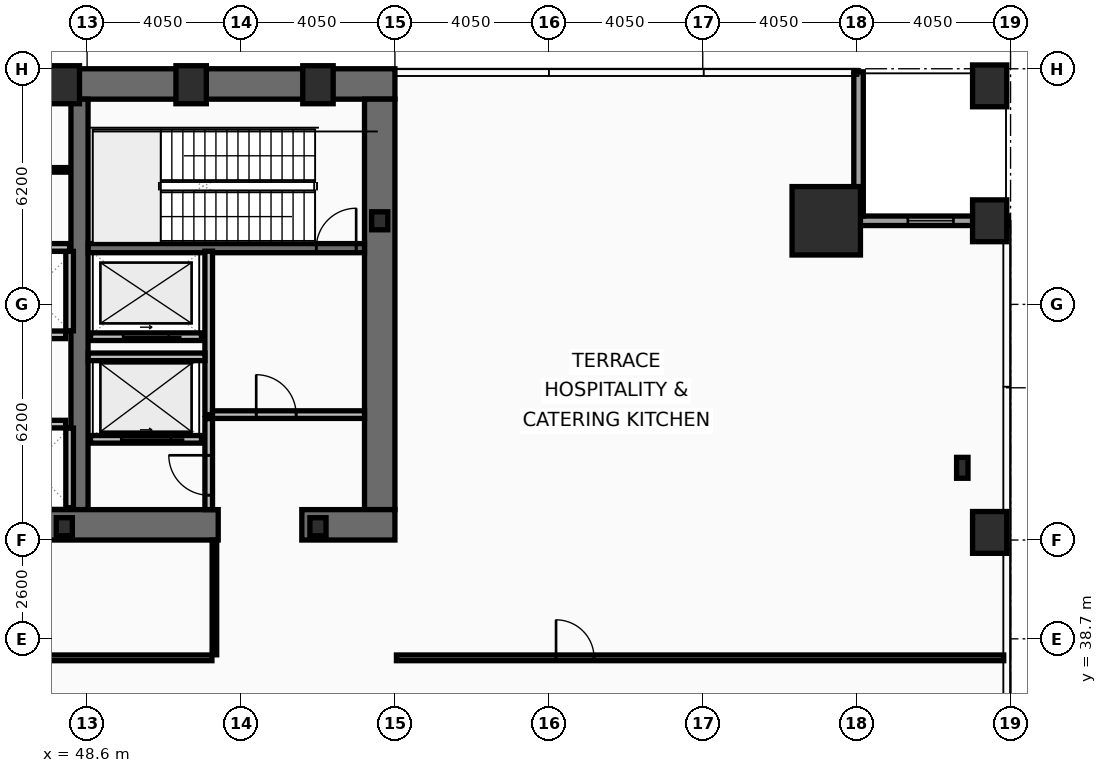
"""IFC4 building model, lengths in metres.
Left out: names, types, materials, properties, quantities, classifications, styles, units other than length and angle.
Written with IfcOpenShell. Run it as: python <this file> out.ifc"""

import sys

from ifc_helpers import new_model, si_unit, direction, frame, frame_2d, origin, origin_2d, place, context, subcontext, project, spatial, rectangle, hollow_rectangle, i_section, extrude, element, fill, save


model = new_model("IFC4")
c1 = context("Model", 3, precision=1e-05, world=origin(), true_north=direction((0.0, 1.0)))
c2 = subcontext(c1, "Body", "Model", "MODEL_VIEW")
j1 = project(units=[si_unit("LENGTHUNIT", "METRE"), si_unit("PLANEANGLEUNIT", "RADIAN")], contexts=[c1])
p1 = place(None, origin())
s1 = spatial("IfcSite", under=j1, at=p1, CompositionType="ELEMENT")
p2 = place(p1, origin())
s2 = spatial("IfcBuilding", under=s1, at=p2, CompositionType="ELEMENT")
p3 = place(p2, frame((0.0, 0.0, 5.4)))
s3 = spatial("IfcBuildingStorey", under=s2, at=p3, CompositionType="ELEMENT", Elevation=5.4)
p4 = place(p3, frame((16.2, 53.3, 0.0), z_axis=(0.0, 0.0, 1.0), x_axis=(1.0, 0.0, 0.0)))
e1 = element("IfcWall", 1, at=p4, inside=s3, PredefinedType="SHEAR", context=c2, shape_type="SweptSolid", body=[
    extrude(rectangle(XDim=40.5, YDim=0.8, at=frame_2d((20.25, 0.0))), origin(), (0.0, 0.0, 1.0), 4.8),
])
p5 = place(p3, frame((56.3, 52.9, 0.0), z_axis=(0.0, 0.0, 1.0), x_axis=(0.0, -1.0, 0.0)))
e2 = element("IfcWall", 2, at=p5, inside=s3, PredefinedType="SHEAR", context=c2, shape_type="SweptSolid", body=[
    extrude(rectangle(XDim=10.8, YDim=0.8, at=frame_2d((5.4, 0.0))), origin(), (0.0, 0.0, 1.0), 4.8),
])
p6 = place(p3, frame((48.4, 42.1, 0.0), z_axis=(0.0, 0.0, 1.0), x_axis=(0.0, 1.0, 0.0)))
e3 = element("IfcWall", 3, at=p6, inside=s3, PredefinedType="SHEAR", context=c2, shape_type="SweptSolid", body=[
    extrude(rectangle(XDim=10.8, YDim=0.45, at=frame_2d((5.4, 0.0))), origin(), (0.0, 0.0, 1.0), 4.8),
])
p7 = place(p3, frame((52.05, 41.7, 0.0), z_axis=(0.0, 0.0, 1.0), x_axis=(-1.0, 0.0, 0.0)))
e4 = element("IfcWall", 4, at=p7, inside=s3, PredefinedType="SHEAR", context=c2, shape_type="SweptSolid", body=[
    extrude(rectangle(XDim=11.3, YDim=0.8, at=frame_2d((5.65, 0.0))), origin(), (0.0, 0.0, 1.0), 4.8),
])
p8 = place(p3, frame((56.7, 41.7, 0.0), z_axis=(0.0, 0.0, 1.0), x_axis=(-1.0, 0.0, 0.0)))
e5 = element("IfcWall", 5, at=p8, inside=s3, PredefinedType="SHEAR", context=c2, shape_type="SweptSolid", body=[
    extrude(rectangle(XDim=2.45, YDim=0.8, at=frame_2d((1.225, 0.0))), origin(), (0.0, 0.0, 1.0), 4.8),
])
p9 = place(p3, frame((48.63, 48.98, 0.0), z_axis=(0.0, 0.0, 1.0), x_axis=(1.0, 0.0, 0.0)))
e6 = element("IfcWall", 6, at=p9, inside=s3, PredefinedType="SHEAR", context=c2, shape_type="SweptSolid", body=[
    extrude(rectangle(XDim=7.27, YDim=0.24, at=frame_2d((3.635, 0.0))), origin(), (0.0, 0.0, 1.0), 4.8),
])
p10 = place(p9, frame((6.0, 0.0, 0.0)))
e7 = element("IfcOpeningElement", 7, at=p10, cuts=e6, PredefinedType="OPENING", context=c2, shape_type="SweptSolid", body=[
    extrude(rectangle(XDim=1.05, YDim=2.15, at=frame_2d((0.525, 1.075))), frame((0.0, 0.13, 0.0), z_axis=(0.0, -1.0, 0.0), x_axis=(1.0, 0.0, 0.0)), (0.0, 0.0, 1.0), 0.26),
])
p11 = place(p3, frame((68.05, 49.7, 0.0), z_axis=(0.0, 0.0, 1.0), x_axis=(1.0, 0.0, 0.0)))
e8 = element("IfcColumn", 8, at=p11, inside=s3, PredefinedType="COLUMN", context=c2, shape_type="SweptSolid", body=[
    extrude(hollow_rectangle(XDim=1.8, YDim=1.8, WallThickness=0.08, at=origin_2d()), origin(), (0.0, 0.0, 1.0), 5.0),
])
for number, where, z_axis, x_axis in (
    (9, (48.0, 53.28, 0.0), (0.0, 0.0, 1.0), (1.0, 0.0, 0.0)),
    (10, (51.337, 53.28, 0.0), (0.0, 0.0, 1.0), (1.0, 0.0, 0.0)),
    (11, (54.675, 53.28, 0.0), (0.0, 0.0, 1.0), (1.0, 0.0, 0.0)),
):
    element("IfcColumn", number, at=place(p3, frame(where, z_axis=z_axis, x_axis=x_axis)), inside=s3, PredefinedType="COLUMN", context=c2, shape_type="SweptSolid", body=[
        extrude(hollow_rectangle(XDim=0.8, YDim=1.0, WallThickness=0.055, at=origin_2d()), origin(), (0.0, 0.0, 1.0), 5.0),
    ])
p12 = place(p3, frame((71.63, 43.2, 0.0), z_axis=(0.0, 0.0, 1.0), x_axis=(1.0, 0.0, 0.0)))
e12 = element("IfcColumn", 12, at=p12, inside=s3, PredefinedType="COLUMN", context=c2, shape_type="SweptSolid", body=[
    extrude(i_section(OverallWidth=0.3, OverallDepth=0.55, WebThickness=0.015, FlangeThickness=0.029, at=origin_2d()), origin(), (0.0, 0.0, 1.0), 5.0),
])
for number, where, z_axis, x_axis in (
    (13, (56.3, 49.7, 0.0), (0.0, 0.0, 1.0), (1.0, 0.0, 0.0)),
    (14, (48.0, 41.65, 0.0), (0.0, 0.0, 1.0), (1.0, 0.0, 0.0)),
    (15, (54.675, 41.65, 0.0), (0.0, 0.0, 1.0), (1.0, 0.0, 0.0)),
):
    element("IfcColumn", number, at=place(p3, frame(where, z_axis=z_axis, x_axis=x_axis)), inside=s3, PredefinedType="COLUMN", context=c2, shape_type="SweptSolid", body=[
        extrude(i_section(OverallWidth=0.424, OverallDepth=0.474, WebThickness=0.048, FlangeThickness=0.077, at=origin_2d()), origin(), (0.0, 0.0, 1.0), 5.0),
    ])
for number, where, z_axis, x_axis in (
    (16, (72.35, 49.7, 0.0), (0.0, 0.0, 1.0), (1.0, 0.0, 0.0)),
    (17, (72.35, 53.25, 0.0), (0.0, 0.0, 1.0), (1.0, 0.0, 0.0)),
    (18, (72.35, 41.5, 0.0), (0.0, 0.0, 1.0), (1.0, 0.0, 0.0)),
):
    element("IfcColumn", number, at=place(p3, frame(where, z_axis=z_axis, x_axis=x_axis)), inside=s3, PredefinedType="PILASTER", context=c2, shape_type="SweptSolid", body=[
        extrude(rectangle(XDim=0.9, YDim=1.1, at=origin_2d()), origin(), (0.0, 0.0, 1.0), 5.0),
    ])
p13 = place(p3, frame((68.775, 49.7, 0.0), z_axis=(0.0, 0.0, 1.0), x_axis=(1.0, 0.0, 0.0)))
e19 = element("IfcWall", 19, at=p13, inside=s3, PredefinedType="SOLIDWALL", context=c2, shape_type="SweptSolid", body=[
    extrude(rectangle(XDim=4.045, YDim=0.25, at=frame_2d((2.022, 0.0))), origin(), (0.0, 0.0, 1.0), 4.14),
])
p14 = place(p13, frame((1.423, 0.0, 0.9)))
e20 = element("IfcOpeningElement", 20, at=p14, cuts=e19, PredefinedType="OPENING", context=c2, shape_type="SweptSolid", body=[
    extrude(rectangle(XDim=1.2, YDim=2.8, at=frame_2d((0.6, 1.4))), frame((0.0, 0.135, 0.0), z_axis=(0.0, -1.0, 0.0), x_axis=(1.0, 0.0, 0.0)), (0.0, 0.0, 1.0), 0.27),
])
p15 = place(p3, frame((68.9, 53.62, 0.0), z_axis=(0.0, 0.0, 1.0), x_axis=(0.0, -1.0, 0.0)))
e21 = element("IfcWall", 21, at=p15, inside=s3, PredefinedType="SOLIDWALL", context=c2, shape_type="SweptSolid", body=[
    extrude(rectangle(XDim=3.795, YDim=0.25, at=frame_2d((1.897, 0.0))), origin(), (0.0, 0.0, 1.0), 4.14),
])
p16 = place(p3, frame((51.61, 43.95, 0.0), z_axis=(0.0, 0.0, 1.0), x_axis=(-1.0, 0.0, 0.0)))
e22 = element("IfcWall", 22, at=p16, inside=s3, PredefinedType="PARTITIONING", context=c2, shape_type="SweptSolid", body=[
    extrude(rectangle(XDim=2.92, YDim=0.2, at=frame_2d((1.46, 0.0))), origin(), (0.0, 0.0, 1.0), 4.8),
])
p17 = place(p16, frame((0.81, 0.0, 0.0)))
e23 = element("IfcOpeningElement", 23, at=p17, cuts=e22, PredefinedType="OPENING", context=c2, shape_type="SweptSolid", body=[
    extrude(rectangle(XDim=1.3, YDim=2.18, at=frame_2d((0.65, 1.09))), frame((0.0, 0.11, 0.0), z_axis=(0.0, -1.0, 0.0), x_axis=(1.0, 0.0, 0.0)), (0.0, 0.0, 1.0), 0.22),
])
p18 = place(p3, frame((51.61, 46.65, 0.0), z_axis=(0.0, 0.0, 1.0), x_axis=(-1.0, 0.0, 0.0)))
e24 = element("IfcWall", 24, at=p18, inside=s3, PredefinedType="PARTITIONING", context=c2, shape_type="SweptSolid", body=[
    extrude(rectangle(XDim=2.92, YDim=0.2, at=frame_2d((1.46, 0.0))), origin(), (0.0, 0.0, 1.0), 4.8),
])
p19 = place(p18, frame((0.86, 0.0, 0.0)))
e25 = element("IfcOpeningElement", 25, at=p19, cuts=e24, PredefinedType="OPENING", context=c2, shape_type="SweptSolid", body=[
    extrude(rectangle(XDim=1.2, YDim=2.18, at=frame_2d((0.6, 1.09))), frame((0.0, 0.11, 0.0), z_axis=(0.0, -1.0, 0.0), x_axis=(1.0, 0.0, 0.0)), (0.0, 0.0, 1.0), 0.22),
])
p20 = place(p3, frame((51.8, 44.6, 0.0), z_axis=(0.0, 0.0, 1.0), x_axis=(0.0, 1.0, 0.0)))
e26 = element("IfcWall", 26, at=p20, inside=s3, PredefinedType="PARTITIONING", context=c2, shape_type="SweptSolid", body=[
    extrude(rectangle(XDim=4.3, YDim=0.2, at=frame_2d((2.15, 0.0))), origin(), (0.0, 0.0, 1.0), 4.8),
])
p21 = place(p3, frame((51.9, 44.6, 0.0), z_axis=(0.0, 0.0, 1.0), x_axis=(1.0, 0.0, 0.0)))
e27 = element("IfcWall", 27, at=p21, inside=s3, PredefinedType="PARTITIONING", context=c2, shape_type="SweptSolid", body=[
    extrude(rectangle(XDim=4.0, YDim=0.2, at=frame_2d((2.0, 0.0))), origin(), (0.0, 0.0, 1.0), 4.8),
])
p22 = place(p21, frame((1.15, 0.0, 0.0)))
e28 = element("IfcOpeningElement", 28, at=p22, cuts=e27, PredefinedType="OPENING", context=c2, shape_type="SweptSolid", body=[
    extrude(rectangle(XDim=1.05, YDim=2.15, at=frame_2d((0.525, 1.075))), frame((0.0, 0.11, 0.0), z_axis=(0.0, -1.0, 0.0), x_axis=(1.0, 0.0, 0.0)), (0.0, 0.0, 1.0), 0.22),
])
p23 = place(p3, frame((48.63, 46.12, 0.0), z_axis=(0.0, 0.0, 1.0), x_axis=(1.0, 0.0, 0.0)))
e29 = element("IfcWall", 29, at=p23, inside=s3, PredefinedType="PARTITIONING", context=c2, shape_type="SweptSolid", body=[
    extrude(rectangle(XDim=3.07, YDim=0.2, at=frame_2d((1.535, 0.0))), origin(), (0.0, 0.0, 1.0), 4.8),
])
p24 = place(p3, frame((51.8, 42.1, 0.0), z_axis=(0.0, 0.0, 1.0), x_axis=(0.0, 1.0, 0.0)))
e30 = element("IfcWall", 30, at=p24, inside=s3, PredefinedType="PARTITIONING", context=c2, shape_type="SweptSolid", body=[
    extrude(rectangle(XDim=2.395, YDim=0.2, at=frame_2d((1.198, 0.0))), origin(), (0.0, 0.0, 1.0), 4.8),
])
p25 = place(p24, frame((0.38, 0.0, 0.0)))
e31 = element("IfcOpeningElement", 31, at=p25, cuts=e30, PredefinedType="OPENING", context=c2, shape_type="SweptSolid", body=[
    extrude(rectangle(XDim=1.05, YDim=2.15, at=frame_2d((0.525, 1.075))), frame((0.0, 0.11, 0.0), z_axis=(0.0, -1.0, 0.0), x_axis=(1.0, 0.0, 0.0)), (0.0, 0.0, 1.0), 0.22),
])
p26 = place(p3, frame((41.825, 46.7, 0.0), z_axis=(0.0, 0.0, 1.0), x_axis=(1.0, 0.0, 0.0)))
e32 = element("IfcWall", 32, at=p26, inside=s3, PredefinedType="PARTITIONING", context=c2, shape_type="SweptSolid", body=[
    extrude(rectangle(XDim=6.21, YDim=0.2, at=frame_2d((3.105, 0.0))), origin(), (0.0, 0.0, 1.0), 4.8),
])
p27 = place(p3, frame((48.14, 46.805, 0.0), z_axis=(0.0, 0.0, 1.0), x_axis=(0.0, 1.0, 0.0)))
e33 = element("IfcWall", 33, at=p27, inside=s3, PredefinedType="PARTITIONING", context=c2, shape_type="SweptSolid", body=[
    extrude(rectangle(XDim=2.09, YDim=0.2, at=frame_2d((1.045, 0.0))), origin(), (0.0, 0.0, 1.0), 4.8),
])
p28 = place(p3, frame((41.825, 44.35, 0.0), z_axis=(0.0, 0.0, 1.0), x_axis=(1.0, 0.0, 0.0)))
e34 = element("IfcWall", 34, at=p28, inside=s3, PredefinedType="PARTITIONING", context=c2, shape_type="SweptSolid", body=[
    extrude(rectangle(XDim=6.21, YDim=0.2, at=frame_2d((3.105, 0.0))), origin(), (0.0, 0.0, 1.0), 4.8),
])
p29 = place(p3, frame((48.14, 42.15, 0.0), z_axis=(0.0, 0.0, 1.0), x_axis=(0.0, 1.0, 0.0)))
e35 = element("IfcWall", 35, at=p29, inside=s3, PredefinedType="PARTITIONING", context=c2, shape_type="SweptSolid", body=[
    extrude(rectangle(XDim=2.095, YDim=0.2, at=frame_2d((1.048, 0.0))), origin(), (0.0, 0.0, 1.0), 4.8),
])
p30 = place(p3, frame((40.58, 52.86, 0.0), z_axis=(0.0, 0.0, 1.0), x_axis=(1.0, 0.0, 0.0)))
e36 = element("IfcWall", 36, at=p30, inside=s3, PredefinedType="PARTITIONING", context=c2, shape_type="SweptSolid", body=[
    extrude(rectangle(XDim=7.56, YDim=0.12, at=frame_2d((3.78, 0.0))), origin(), (0.0, 0.0, 1.0), 4.8),
])
p31 = place(p3, frame((40.58, 49.0, 0.0), z_axis=(0.0, 0.0, 1.0), x_axis=(1.0, 0.0, 0.0)))
e37 = element("IfcWall", 37, at=p31, inside=s3, PredefinedType="PARTITIONING", context=c2, shape_type="SweptSolid", body=[
    extrude(rectangle(XDim=7.56, YDim=0.2, at=frame_2d((3.78, 0.0))), origin(), (0.0, 0.0, 1.0), 4.8),
])
p32 = place(p31, frame((0.16, 0.0, 0.0)))
e38 = element("IfcOpeningElement", 38, at=p32, cuts=e37, PredefinedType="OPENING", context=c2, shape_type="SweptSolid", body=[
    extrude(rectangle(XDim=0.95, YDim=2.1, at=frame_2d((0.475, 1.05))), frame((0.0, 0.11, 0.0), z_axis=(0.0, -1.0, 0.0), x_axis=(1.0, 0.0, 0.0)), (0.0, 0.0, 1.0), 0.22),
])
p33 = place(p3, frame((40.63, 51.04, 0.0), z_axis=(0.0, 0.0, 1.0), x_axis=(1.0, 0.0, 0.0)))
e39 = element("IfcWall", 39, at=p33, inside=s3, PredefinedType="PARTITIONING", context=c2, shape_type="SweptSolid", body=[
    extrude(rectangle(XDim=7.46, YDim=0.12, at=frame_2d((3.73, 0.0))), origin(), (0.0, 0.0, 1.0), 4.8),
])
p34 = place(p33, frame((2.4, 0.0, 0.0)))
e40 = element("IfcOpeningElement", 40, at=p34, cuts=e39, PredefinedType="OPENING", context=c2, shape_type="SweptSolid", body=[
    extrude(rectangle(XDim=0.9, YDim=2.05, at=frame_2d((0.45, 1.025))), frame((0.0, 0.07, 0.0), z_axis=(0.0, -1.0, 0.0), x_axis=(1.0, 0.0, 0.0)), (0.0, 0.0, 1.0), 0.14),
])
p35 = place(p3, frame((56.74, 38.2, 0.0), z_axis=(0.0, 0.0, 1.0), x_axis=(1.0, 0.0, 0.0)))
e41 = element("IfcWall", 41, at=p35, inside=s3, PredefinedType="PARTITIONING", context=c2, shape_type="SweptSolid", body=[
    extrude(rectangle(XDim=15.98, YDim=0.15, at=frame_2d((7.99, 0.0))), origin(), (0.0, 0.0, 1.0), 4.14),
])
p36 = place(p35, frame((4.2, 0.0, 0.0)))
e42 = element("IfcOpeningElement", 42, at=p36, cuts=e41, PredefinedType="OPENING", context=c2, shape_type="SweptSolid", body=[
    extrude(rectangle(XDim=1.0, YDim=2.05, at=frame_2d((0.5, 1.025))), frame((0.0, 0.085, 0.0), z_axis=(0.0, -1.0, 0.0), x_axis=(1.0, 0.0, 0.0)), (0.0, 0.0, 1.0), 0.17),
])
p37 = place(p3, frame((51.95, 38.28, 0.0), z_axis=(0.0, 0.0, 1.0), x_axis=(0.0, 1.0, 0.0)))
e43 = element("IfcWall", 43, at=p37, inside=s3, PredefinedType="PARTITIONING", context=c2, shape_type="SweptSolid", body=[
    extrude(rectangle(XDim=3.02, YDim=0.12, at=frame_2d((1.51, 0.0))), origin(), (0.0, 0.0, 1.0), 4.8),
])
p38 = place(p3, frame((40.915, 38.2, 0.0), z_axis=(0.0, 0.0, 1.0), x_axis=(1.0, 0.0, 0.0)))
e44 = element("IfcWall", 44, at=p38, inside=s3, PredefinedType="PARTITIONING", context=c2, shape_type="SweptSolid", body=[
    extrude(rectangle(XDim=10.97, YDim=0.15, at=frame_2d((5.485, 0.0))), origin(), (0.0, 0.0, 1.0), 3.89),
])
p39 = place(p38, frame((3.5, 0.0, 0.0)))
e45 = element("IfcOpeningElement", 45, at=p39, cuts=e44, PredefinedType="OPENING", context=c2, shape_type="SweptSolid", body=[
    extrude(rectangle(XDim=0.9, YDim=2.05, at=frame_2d((0.45, 1.025))), frame((0.0, 0.085, 0.0), z_axis=(0.0, -1.0, 0.0), x_axis=(1.0, 0.0, 0.0)), (0.0, 0.0, 1.0), 0.17),
])
p40 = place(p14, origin())
e46 = element("IfcWindow", 46, at=p40, inside=s3, PartitioningType="SINGLE_PANEL", PredefinedType="WINDOW", context=c2, shape_type="SweptSolid", body=[
    extrude(rectangle(XDim=1.2, YDim=2.8, at=frame_2d((0.6, 1.4))), frame((0.0, 0.03, 0.0), z_axis=(0.0, -1.0, 0.0), x_axis=(1.0, 0.0, 0.0)), (0.0, 0.0, 1.0), 0.06),
])
fill(e20, e46)
p41 = place(p10, origin())
e47 = element("IfcDoor", 47, at=p41, inside=s3, OperationType="SINGLE_SWING_RIGHT", PredefinedType="DOOR", context=c2, shape_type="SweptSolid", body=[
    extrude(rectangle(XDim=1.05, YDim=2.15, at=frame_2d((0.525, 1.075))), frame((0.0, 0.025, 0.0), z_axis=(0.0, -1.0, 0.0), x_axis=(1.0, 0.0, 0.0)), (0.0, 0.0, 1.0), 0.05),
])
fill(e7, e47)
p42 = place(p17, origin())
e48 = element("IfcDoor", 48, at=p42, inside=s3, OperationType="SLIDING_TO_LEFT", PredefinedType="DOOR", context=c2, shape_type="SweptSolid", body=[
    extrude(rectangle(XDim=1.3, YDim=2.18, at=frame_2d((0.65, 1.09))), frame((0.0, 0.025, 0.0), z_axis=(0.0, -1.0, 0.0), x_axis=(1.0, 0.0, 0.0)), (0.0, 0.0, 1.0), 0.05),
])
fill(e23, e48)
p43 = place(p19, origin())
e49 = element("IfcDoor", 49, at=p43, inside=s3, OperationType="SLIDING_TO_LEFT", PredefinedType="DOOR", context=c2, shape_type="SweptSolid", body=[
    extrude(rectangle(XDim=1.2, YDim=2.18, at=frame_2d((0.6, 1.09))), frame((0.0, 0.025, 0.0), z_axis=(0.0, -1.0, 0.0), x_axis=(1.0, 0.0, 0.0)), (0.0, 0.0, 1.0), 0.05),
])
fill(e25, e49)
p44 = place(p22, origin())
e50 = element("IfcDoor", 50, at=p44, inside=s3, OperationType="SINGLE_SWING_LEFT", PredefinedType="DOOR", context=c2, shape_type="SweptSolid", body=[
    extrude(rectangle(XDim=1.05, YDim=2.15, at=frame_2d((0.525, 1.075))), frame((0.0, 0.025, 0.0), z_axis=(0.0, -1.0, 0.0), x_axis=(1.0, 0.0, 0.0)), (0.0, 0.0, 1.0), 0.05),
])
fill(e28, e50)
p45 = place(p25, origin())
e51 = element("IfcDoor", 51, at=p45, inside=s3, OperationType="SINGLE_SWING_RIGHT", PredefinedType="DOOR", context=c2, shape_type="SweptSolid", body=[
    extrude(rectangle(XDim=1.05, YDim=2.15, at=frame_2d((0.525, 1.075))), frame((0.0, 0.025, 0.0), z_axis=(0.0, -1.0, 0.0), x_axis=(1.0, 0.0, 0.0)), (0.0, 0.0, 1.0), 0.05),
])
fill(e31, e51)
p46 = place(p36, origin())
e52 = element("IfcDoor", 52, at=p46, inside=s3, OperationType="SINGLE_SWING_LEFT", PredefinedType="DOOR", context=c2, shape_type="SweptSolid", body=[
    extrude(rectangle(XDim=1.0, YDim=2.05, at=frame_2d((0.5, 1.025))), frame((0.0, 0.025, 0.0), z_axis=(0.0, -1.0, 0.0), x_axis=(1.0, 0.0, 0.0)), (0.0, 0.0, 1.0), 0.05),
])
fill(e42, e52)
save(model, sys.argv[1])
